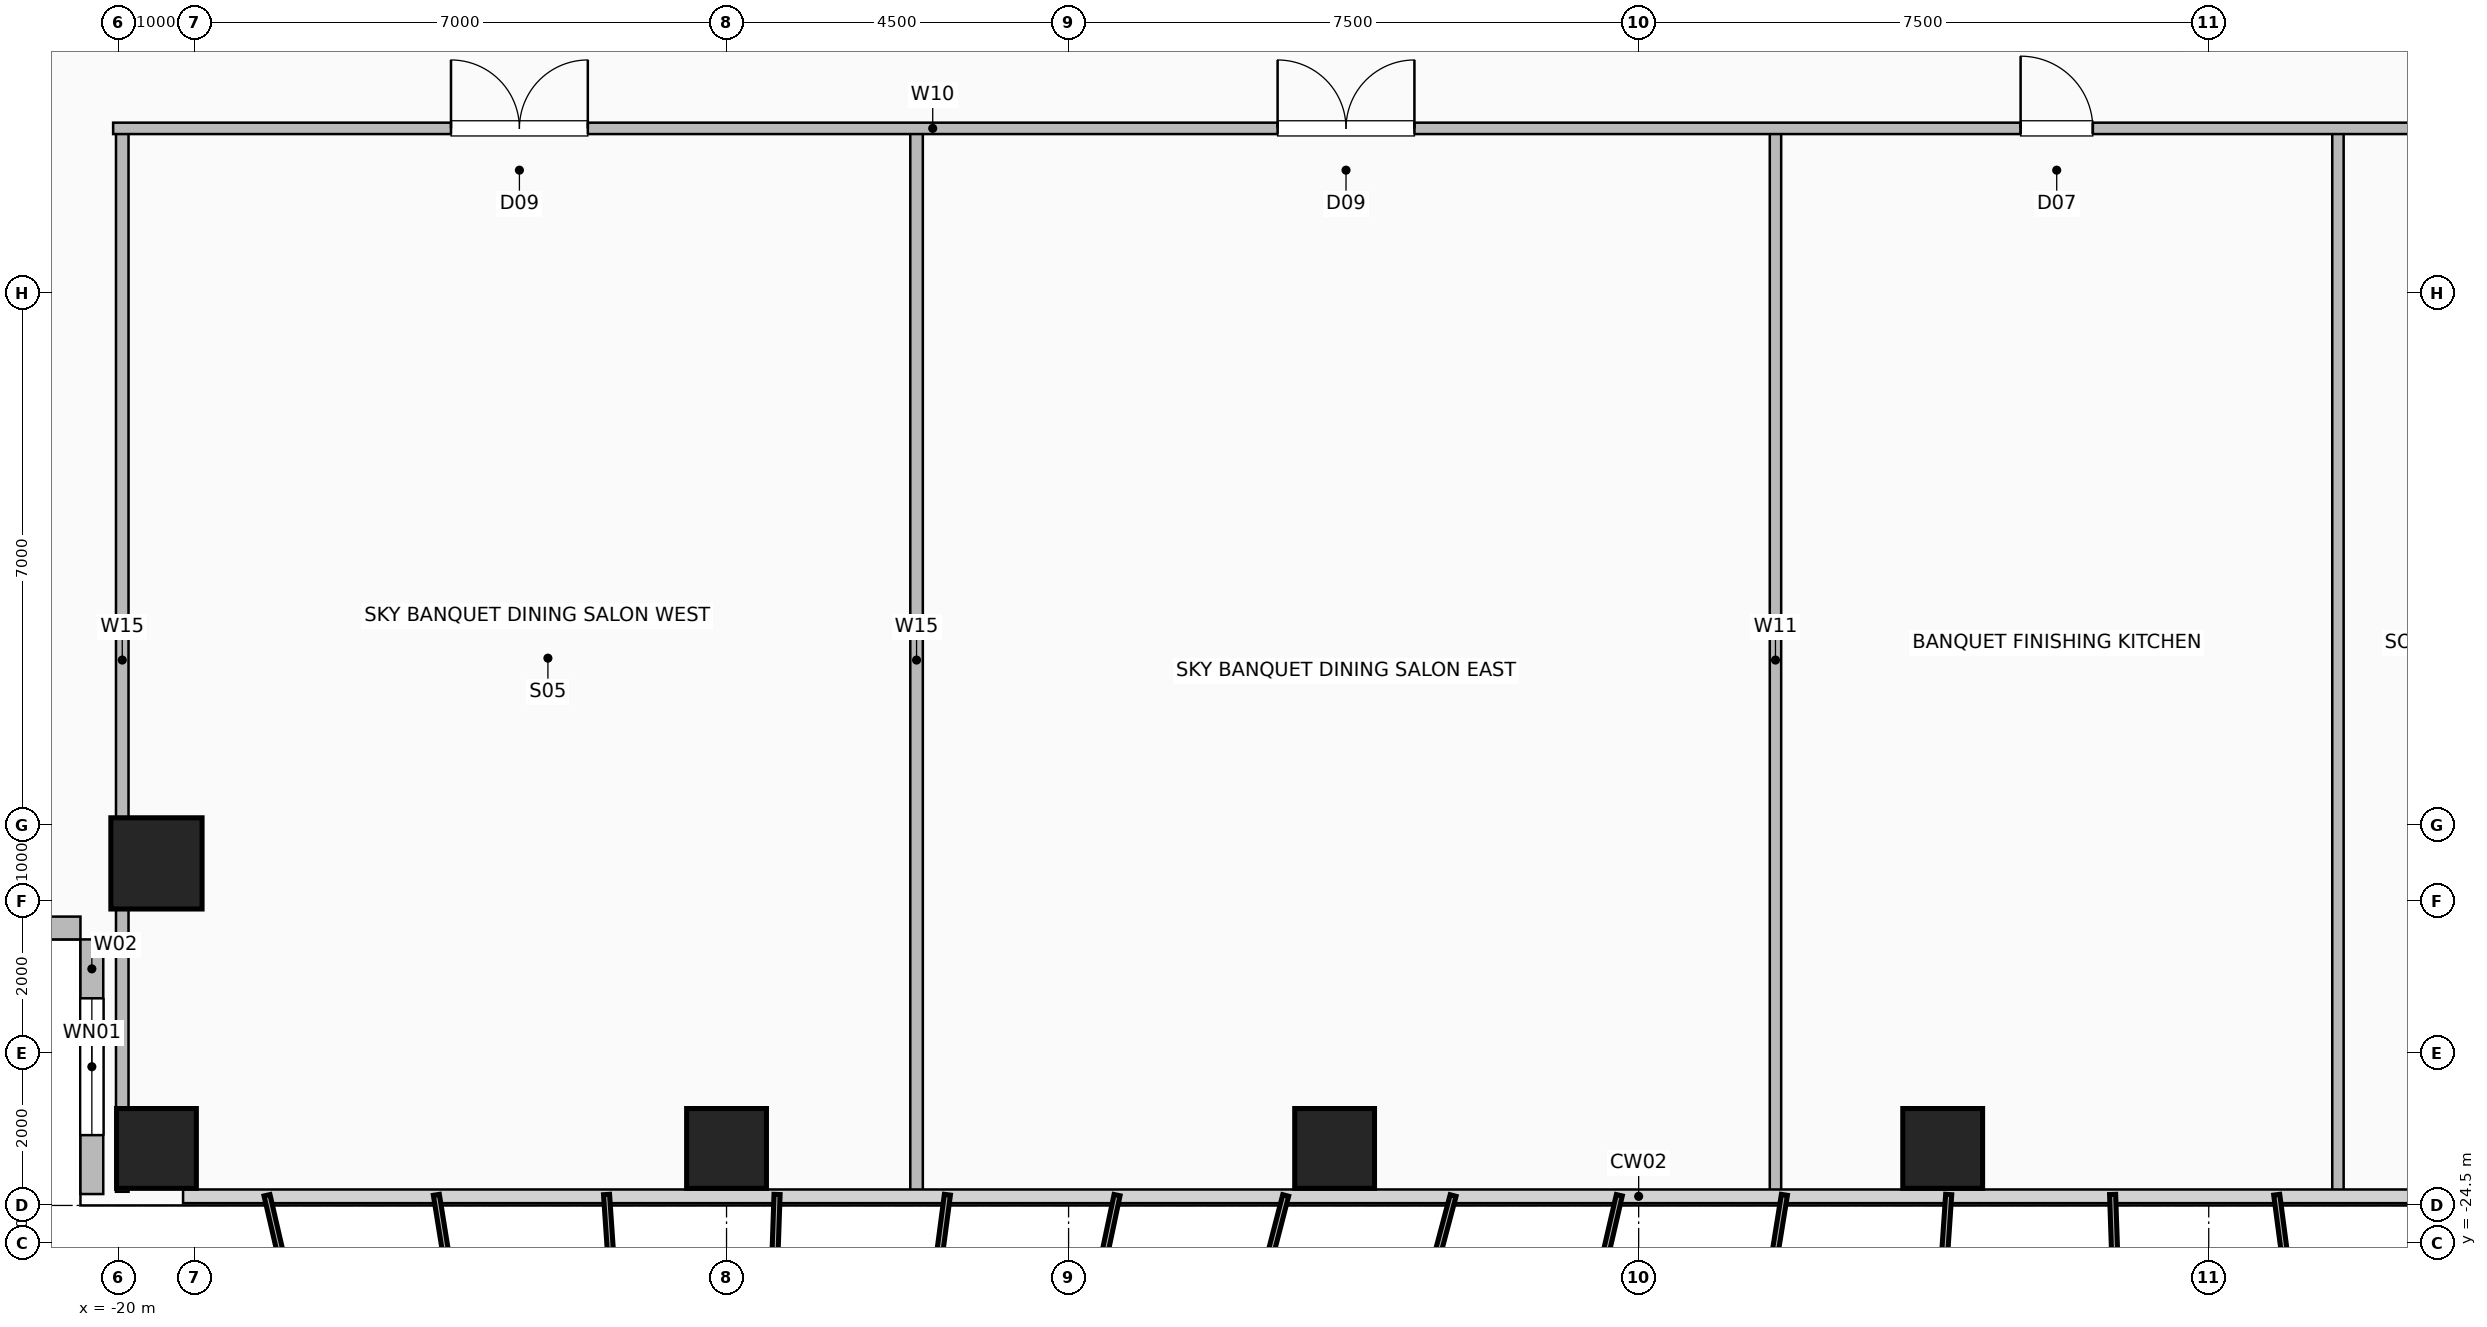
"""IFC4 building model, lengths in metres.
Left out: names, types, materials, properties, quantities, classifications, styles, units other than length and angle.
Written with IfcOpenShell. Run it as: python <this file> out.ifc"""

import sys

from ifc_helpers import new_model, si_unit, direction, frame, frame_2d, origin, origin_2d, place, context, subcontext, project, spatial, rectangle, hollow_rectangle, extrude, element, fill, save


model = new_model("IFC4")
c1 = context("Model", 3, precision=1e-05, world=origin(), true_north=direction((0.0, 1.0)))
c2 = subcontext(c1, "Body", "Model", "MODEL_VIEW")
j1 = project(units=[si_unit("LENGTHUNIT", "METRE"), si_unit("PLANEANGLEUNIT", "RADIAN")], contexts=[c1])
p1 = place(None, origin())
s1 = spatial("IfcSite", under=j1, at=p1, CompositionType="ELEMENT")
p2 = place(p1, origin())
s2 = spatial("IfcBuilding", under=s1, at=p2, CompositionType="ELEMENT")
p3 = place(p2, frame((0.0, 0.0, 69.0)))
s3 = spatial("IfcBuildingStorey", under=s2, at=p3, CompositionType="ELEMENT", Elevation=69.0)
for number, where, z_axis, x_axis in (
    (1, (-19.5, -23.25, 0.0), (0.0, 0.0, 1.0), (1.0, 0.0, 0.0)),
    (2, (-12.0, -23.25, 0.0), (0.0, 0.0, 1.0), (1.0, 0.0, 0.0)),
    (3, (-4.0, -23.25, 0.0), (0.0, 0.0, 1.0), (1.0, 0.0, 0.0)),
    (4, (4.0, -23.25, 0.0), (0.0, 0.0, 1.0), (1.0, 0.0, 0.0)),
):
    element("IfcColumn", number, at=place(p3, frame(where, z_axis=z_axis, x_axis=x_axis)), inside=s3, PredefinedType="COLUMN", context=c2, shape_type="SweptSolid", body=[
        extrude(hollow_rectangle(XDim=1.05, YDim=1.05, WallThickness=0.05, at=origin_2d()), origin(), (0.0, 0.0, 1.0), 3.5),
    ])
p4 = place(p3, frame((-19.5, -19.5, 0.0), z_axis=(0.0, 0.0, 1.0), x_axis=(1.0, 0.0, 0.0)))
e5 = element("IfcColumn", 5, at=p4, inside=s3, PredefinedType="COLUMN", context=c2, shape_type="SweptSolid", body=[
    extrude(hollow_rectangle(XDim=1.2, YDim=1.2, WallThickness=0.055, at=origin_2d()), origin(), (0.0, 0.0, 1.0), 3.5),
])
p5 = place(p3, frame((-20.35, -23.85, 0.0), z_axis=(0.0, 0.0, 1.0), x_axis=(0.0, 1.0, 0.0)))
e6 = element("IfcWall", 6, at=p5, inside=s3, PredefinedType="SOLIDWALL", context=c2, shape_type="SweptSolid", body=[
    extrude(rectangle(XDim=3.35, YDim=0.3, at=frame_2d((1.675, 0.0))), origin(), (0.0, 0.0, 1.0), 3.25),
])
p6 = place(p5, frame((0.775, 0.0, 0.9)))
e7 = element("IfcOpeningElement", 7, at=p6, cuts=e6, PredefinedType="OPENING", context=c2, shape_type="SweptSolid", body=[
    extrude(rectangle(XDim=1.8, YDim=1.8, at=frame_2d((0.9, 0.9))), frame((0.0, 0.16, 0.0), z_axis=(0.0, -1.0, 0.0), x_axis=(1.0, 0.0, 0.0)), (0.0, 0.0, 1.0), 0.32),
])
p7 = place(p3, frame((-23.85, -20.35, 0.0), z_axis=(0.0, 0.0, 1.0), x_axis=(1.0, 0.0, 0.0)))
e8 = element("IfcWall", 8, at=p7, inside=s3, PredefinedType="SOLIDWALL", context=c2, shape_type="SweptSolid", body=[
    extrude(rectangle(XDim=3.35, YDim=0.3, at=frame_2d((1.675, 0.0))), origin(), (0.0, 0.0, 1.0), 3.25),
])
for number, where, z_axis, x_axis in (
    (9, (-19.95, -23.82, 0.0), (0.0, 0.0, 1.0), (0.0, 1.0, 0.0)),
    (10, (-9.5, -23.82, 0.0), (0.0, 0.0, 1.0), (0.0, 1.0, 0.0)),
):
    element("IfcWall", number, at=place(p3, frame(where, z_axis=z_axis, x_axis=x_axis)), inside=s3, PredefinedType="PLUMBINGWALL", context=c2, shape_type="SweptSolid", body=[
        extrude(rectangle(XDim=13.99, YDim=0.165, at=frame_2d((6.995, 0.0))), origin(), (0.0, 0.0, 1.0), 3.25),
    ])
for number, where, z_axis, x_axis in (
    (11, (1.8, -23.82, 0.0), (0.0, 0.0, 1.0), (0.0, 1.0, 0.0)),
    (12, (9.2, -23.82, 0.0), (0.0, 0.0, 1.0), (0.0, 1.0, 0.0)),
):
    element("IfcWall", number, at=place(p3, frame(where, z_axis=z_axis, x_axis=x_axis)), inside=s3, PredefinedType="PARTITIONING", context=c2, shape_type="SweptSolid", body=[
        extrude(rectangle(XDim=13.99, YDim=0.15, at=frame_2d((6.995, 0.0))), origin(), (0.0, 0.0, 1.0), 3.25),
    ])
p8 = place(p3, frame((-20.07, -9.83, 0.0), z_axis=(0.0, 0.0, 1.0), x_axis=(1.0, 0.0, 0.0)))
e13 = element("IfcWall", 13, at=p8, inside=s3, PredefinedType="PARTITIONING", context=c2, shape_type="SweptSolid", body=[
    extrude(rectangle(XDim=40.14, YDim=0.15, at=frame_2d((20.07, 0.0))), origin(), (0.0, 0.0, 1.0), 3.25),
])
p9 = place(p8, frame((4.445, 0.0, 0.0)))
e14 = element("IfcOpeningElement", 14, at=p9, cuts=e13, PredefinedType="OPENING", context=c2, shape_type="SweptSolid", body=[
    extrude(rectangle(XDim=1.8, YDim=2.08, at=frame_2d((0.9, 1.04))), frame((0.0, 0.085, 0.0), z_axis=(0.0, -1.0, 0.0), x_axis=(1.0, 0.0, 0.0)), (0.0, 0.0, 1.0), 0.17),
])
p10 = place(p8, frame((15.32, 0.0, 0.0)))
e15 = element("IfcOpeningElement", 15, at=p10, cuts=e13, PredefinedType="OPENING", context=c2, shape_type="SweptSolid", body=[
    extrude(rectangle(XDim=1.8, YDim=2.08, at=frame_2d((0.9, 1.04))), frame((0.0, 0.085, 0.0), z_axis=(0.0, -1.0, 0.0), x_axis=(1.0, 0.0, 0.0)), (0.0, 0.0, 1.0), 0.17),
])
p11 = place(p8, frame((25.095, 0.0, 0.0)))
e16 = element("IfcOpeningElement", 16, at=p11, cuts=e13, PredefinedType="OPENING", context=c2, shape_type="SweptSolid", body=[
    extrude(rectangle(XDim=0.95, YDim=2.06, at=frame_2d((0.475, 1.03))), frame((0.0, 0.085, 0.0), z_axis=(0.0, -1.0, 0.0), x_axis=(1.0, 0.0, 0.0)), (0.0, 0.0, 1.0), 0.17),
])
p12 = place(p8, frame((30.695, 0.0, 0.0)))
e17 = element("IfcOpeningElement", 17, at=p12, cuts=e13, PredefinedType="OPENING", context=c2, shape_type="SweptSolid", body=[
    extrude(rectangle(XDim=0.95, YDim=2.06, at=frame_2d((0.475, 1.03))), frame((0.0, 0.085, 0.0), z_axis=(0.0, -1.0, 0.0), x_axis=(1.0, 0.0, 0.0)), (0.0, 0.0, 1.0), 0.17),
])
p13 = place(p8, frame((33.645, 0.0, 0.0)))
e18 = element("IfcOpeningElement", 18, at=p13, cuts=e13, PredefinedType="OPENING", context=c2, shape_type="SweptSolid", body=[
    extrude(rectangle(XDim=0.85, YDim=2.05, at=frame_2d((0.425, 1.025))), frame((0.0, 0.085, 0.0), z_axis=(0.0, -1.0, 0.0), x_axis=(1.0, 0.0, 0.0)), (0.0, 0.0, 1.0), 0.17),
])
p14 = place(p8, frame((35.92, 0.0, 0.0)))
e19 = element("IfcOpeningElement", 19, at=p14, cuts=e13, PredefinedType="OPENING", context=c2, shape_type="SweptSolid", body=[
    extrude(rectangle(XDim=0.85, YDim=2.05, at=frame_2d((0.425, 1.025))), frame((0.0, 0.085, 0.0), z_axis=(0.0, -1.0, 0.0), x_axis=(1.0, 0.0, 0.0)), (0.0, 0.0, 1.0), 0.17),
])
p15 = place(p8, frame((38.345, 0.0, 0.0)))
e20 = element("IfcOpeningElement", 20, at=p15, cuts=e13, PredefinedType="OPENING", context=c2, shape_type="SweptSolid", body=[
    extrude(rectangle(XDim=0.95, YDim=2.06, at=frame_2d((0.475, 1.03))), frame((0.0, 0.085, 0.0), z_axis=(0.0, -1.0, 0.0), x_axis=(1.0, 0.0, 0.0)), (0.0, 0.0, 1.0), 0.17),
])
p16 = place(p6, origin())
e21 = element("IfcWindow", 21, at=p16, inside=s3, PartitioningType="SINGLE_PANEL", PredefinedType="WINDOW", context=c2, shape_type="SweptSolid", body=[
    extrude(rectangle(XDim=1.8, YDim=1.8, at=frame_2d((0.9, 0.9))), frame((0.0, 0.03, 0.0), z_axis=(0.0, -1.0, 0.0), x_axis=(1.0, 0.0, 0.0)), (0.0, 0.0, 1.0), 0.06),
])
fill(e7, e21)
p17 = place(p9, origin())
e22 = element("IfcDoor", 22, at=p17, inside=s3, OperationType="DOUBLE_DOOR_SINGLE_SWING", PredefinedType="DOOR", context=c2, shape_type="SweptSolid", body=[
    extrude(rectangle(XDim=1.8, YDim=2.08, at=frame_2d((0.9, 1.04))), frame((0.0, 0.025, 0.0), z_axis=(0.0, -1.0, 0.0), x_axis=(1.0, 0.0, 0.0)), (0.0, 0.0, 1.0), 0.05),
])
fill(e14, e22)
p18 = place(p10, origin())
e23 = element("IfcDoor", 23, at=p18, inside=s3, OperationType="DOUBLE_DOOR_SINGLE_SWING", PredefinedType="DOOR", context=c2, shape_type="SweptSolid", body=[
    extrude(rectangle(XDim=1.8, YDim=2.08, at=frame_2d((0.9, 1.04))), frame((0.0, 0.025, 0.0), z_axis=(0.0, -1.0, 0.0), x_axis=(1.0, 0.0, 0.0)), (0.0, 0.0, 1.0), 0.05),
])
fill(e15, e23)
p19 = place(p11, origin())
e24 = element("IfcDoor", 24, at=p19, inside=s3, OperationType="SINGLE_SWING_LEFT", PredefinedType="DOOR", context=c2, shape_type="SweptSolid", body=[
    extrude(rectangle(XDim=0.95, YDim=2.06, at=frame_2d((0.475, 1.03))), frame((0.0, 0.025, 0.0), z_axis=(0.0, -1.0, 0.0), x_axis=(1.0, 0.0, 0.0)), (0.0, 0.0, 1.0), 0.05),
])
fill(e16, e24)
save(model, sys.argv[1])
